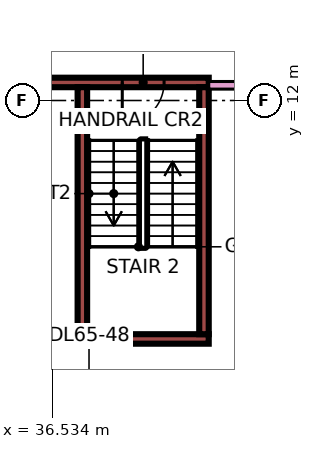
"""IFC4 building model, lengths in metres.
Left out: names, types, materials, properties, quantities, classifications, styles, units other than length and angle.
Written with IfcOpenShell. Run it as: python <this file> out.ifc"""

import sys

from ifc_helpers import new_model, si_unit, direction, frame, frame_2d, origin, place, context, subcontext, project, spatial, rectangle, extrude, element, fill, save


model = new_model("IFC4")
c1 = context("Model", 3, precision=1e-05, world=origin(), true_north=direction((0.0, 1.0)))
c2 = subcontext(c1, "Body", "Model", "MODEL_VIEW")
j1 = project(units=[si_unit("LENGTHUNIT", "METRE"), si_unit("PLANEANGLEUNIT", "RADIAN")], contexts=[c1])
p1 = place(None, origin())
s1 = spatial("IfcSite", under=j1, at=p1, CompositionType="ELEMENT")
p2 = place(p1, origin())
s2 = spatial("IfcBuilding", under=s1, at=p2, CompositionType="ELEMENT")
p3 = place(p2, frame((0.0, 0.0, 280.9)))
s3 = spatial("IfcBuildingStorey", under=s2, at=p3, CompositionType="ELEMENT", Elevation=280.9)
p4 = place(p3, frame((37.2, 5.725, 0.0), z_axis=(0.0, 0.0, 1.0), x_axis=(1.0, 0.0, 0.0)))
e1 = element("IfcWall", 1, at=p4, inside=s3, PredefinedType="SHEAR", context=c2, shape_type="SweptSolid", body=[
    extrude(rectangle(XDim=3.45, YDim=0.25, at=frame_2d((1.725, 0.0))), origin(), (0.0, 0.0, 1.0), 3.75),
])
p5 = place(p3, frame((36.4, 12.475, 0.0), z_axis=(0.0, 0.0, 1.0), x_axis=(1.0, 0.0, 0.0)))
e2 = element("IfcWall", 2, at=p5, inside=s3, PredefinedType="SHEAR", context=c2, shape_type="SweptSolid", body=[
    extrude(rectangle(XDim=4.25, YDim=0.25, at=frame_2d((2.125, 0.0))), origin(), (0.0, 0.0, 1.0), 3.75),
])
p6 = place(p5, frame((1.975, 0.0, 0.0)))
e3 = element("IfcOpeningElement", 3, at=p6, cuts=e2, PredefinedType="OPENING", context=c2, shape_type="SweptSolid", body=[
    extrude(rectangle(XDim=1.1, YDim=2.2, at=frame_2d((0.55, 1.1))), frame((0.0, 0.135, 0.0), z_axis=(0.0, -1.0, 0.0), x_axis=(1.0, 0.0, 0.0)), (0.0, 0.0, 1.0), 0.27),
])
for number, where, z_axis, x_axis in (
    (4, (37.325, 5.85, 0.0), (0.0, 0.0, 1.0), (0.0, 1.0, 0.0)),
    (5, (40.525, 5.85, 0.0), (0.0, 0.0, 1.0), (0.0, 1.0, 0.0)),
):
    element("IfcWall", number, at=place(p3, frame(where, z_axis=z_axis, x_axis=x_axis)), inside=s3, PredefinedType="SHEAR", context=c2, shape_type="SweptSolid", body=[
        extrude(rectangle(XDim=6.5, YDim=0.25, at=frame_2d((3.25, 0.0))), origin(), (0.0, 0.0, 1.0), 3.75),
    ])
p7 = place(p3, frame((40.65, 12.4, 0.0), z_axis=(0.0, 0.0, 1.0), x_axis=(1.0, 0.0, 0.0)))
e6 = element("IfcWall", 6, at=p7, inside=s3, PredefinedType="PARTITIONING", context=c2, shape_type="SweptSolid", body=[
    extrude(rectangle(XDim=22.276, YDim=0.2, at=frame_2d((11.138, 0.0))), origin(), (0.0, 0.0, 1.0), 3.35),
])
p8 = place(p7, frame((14.7, 0.0, 0.0)))
e7 = element("IfcOpeningElement", 7, at=p8, cuts=e6, PredefinedType="OPENING", context=c2, shape_type="SweptSolid", body=[
    extrude(rectangle(XDim=1.0, YDim=2.1, at=frame_2d((0.5, 1.05))), frame((0.0, 0.11, 0.0), z_axis=(0.0, -1.0, 0.0), x_axis=(1.0, 0.0, 0.0)), (0.0, 0.0, 1.0), 0.22),
])
p9 = place(p7, frame((1.05, 0.0, 0.0)))
e8 = element("IfcOpeningElement", 8, at=p9, cuts=e6, PredefinedType="OPENING", context=c2, shape_type="SweptSolid", body=[
    extrude(rectangle(XDim=1.0, YDim=2.1, at=frame_2d((0.5, 1.05))), frame((0.0, 0.11, 0.0), z_axis=(0.0, -1.0, 0.0), x_axis=(1.0, 0.0, 0.0)), (0.0, 0.0, 1.0), 0.22),
])
p10 = place(p6, frame((1.1, 0.0, 0.0), z_axis=(0.0, 0.0, 1.0), x_axis=(-1.0, 0.0, 0.0)))
e9 = element("IfcDoor", 9, at=p10, inside=s3, OperationType="SINGLE_SWING_LEFT", PredefinedType="DOOR", context=c2, shape_type="SweptSolid", body=[
    extrude(rectangle(XDim=1.1, YDim=2.2, at=frame_2d((0.55, 1.1))), frame((0.0, 0.025, 0.0), z_axis=(0.0, -1.0, 0.0), x_axis=(1.0, 0.0, 0.0)), (0.0, 0.0, 1.0), 0.05),
])
fill(e3, e9)
save(model, sys.argv[1])
